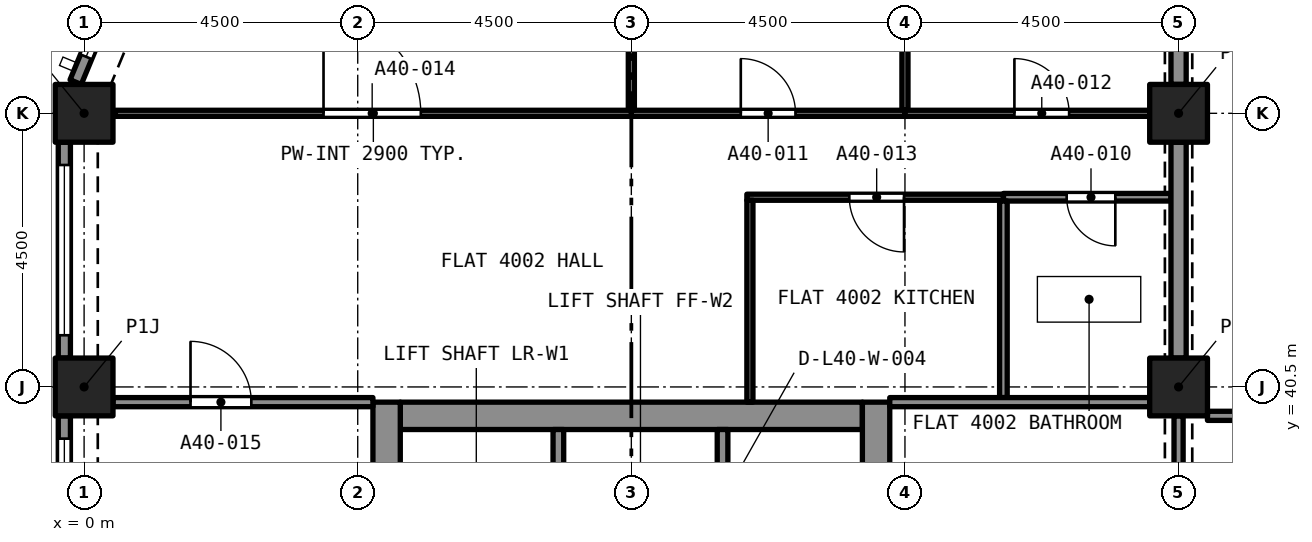
"""IFC4 building model, lengths in metres.
Left out: names, types, materials, properties, quantities, classifications, styles, units other than length and angle.
Written with IfcOpenShell. Run it as: python <this file> out.ifc"""

import sys

from ifc_helpers import new_model, si_unit, direction, frame, frame_2d, origin, origin_2d, place, context, subcontext, project, spatial, rectangle, extrude, element, fill, save


model = new_model("IFC4")
c1 = context("Model", 3, precision=1e-05, world=origin(), true_north=direction((0.0, 1.0)))
c2 = subcontext(c1, "Body", "Model", "MODEL_VIEW")
j1 = project(units=[si_unit("LENGTHUNIT", "METRE"), si_unit("PLANEANGLEUNIT", "RADIAN")], contexts=[c1])
p1 = place(None, origin())
s1 = spatial("IfcSite", under=j1, at=p1, CompositionType="ELEMENT")
p2 = place(p1, origin())
s2 = spatial("IfcBuilding", under=s1, at=p2, CompositionType="ELEMENT")
p3 = place(p2, frame((0.0, 0.0, 143.0)))
s3 = spatial("IfcBuildingStorey", under=s2, at=p3, CompositionType="ELEMENT", Elevation=143.0)
for number, where, z_axis, x_axis in (
    (1, (0.0, 40.5, 0.0), (0.0, 0.0, 1.0), (1.0, 0.0, 0.0)),
    (2, (18.0, 40.5, 0.0), (0.0, 0.0, 1.0), (1.0, 0.0, 0.0)),
    (3, (0.0, 45.0, 0.0), (0.0, 0.0, 1.0), (1.0, 0.0, 0.0)),
    (4, (18.0, 45.0, 0.0), (0.0, 0.0, 1.0), (1.0, 0.0, 0.0)),
):
    element("IfcColumn", number, at=place(p3, frame(where, z_axis=z_axis, x_axis=x_axis)), inside=s3, PredefinedType="COLUMN", context=c2, shape_type="SweptSolid", body=[
        extrude(rectangle(XDim=0.95, YDim=0.95, at=origin_2d()), origin(), (0.0, 0.0, 1.0), 3.2),
    ])
p4 = place(p3, frame((5.2, 40.025, 0.0), z_axis=(0.0, 0.0, 1.0), x_axis=(1.0, 0.0, 0.0)))
e5 = element("IfcWall", 5, at=p4, inside=s3, PredefinedType="SOLIDWALL", context=c2, shape_type="SweptSolid", body=[
    extrude(rectangle(XDim=7.6, YDim=0.45, at=frame_2d((3.8, 0.0))), origin(), (0.0, 0.0, 1.0), 3.2),
])
p5 = place(p3, frame((4.975, 27.25, 0.0), z_axis=(0.0, 0.0, 1.0), x_axis=(0.0, 1.0, 0.0)))
e6 = element("IfcWall", 6, at=p5, inside=s3, PredefinedType="SOLIDWALL", context=c2, shape_type="SweptSolid", body=[
    extrude(rectangle(XDim=13.0, YDim=0.45, at=frame_2d((6.5, 0.0))), origin(), (0.0, 0.0, 1.0), 3.2),
])
p6 = place(p5, frame((8.7, 0.0, 0.0)))
e7 = element("IfcOpeningElement", 7, at=p6, cuts=e6, PredefinedType="OPENING", context=c2, shape_type="SweptSolid", body=[
    extrude(rectangle(XDim=1.2, YDim=2.1, at=frame_2d((0.6, 1.05))), frame((0.0, 0.235, 0.0), z_axis=(0.0, -1.0, 0.0), x_axis=(1.0, 0.0, 0.0)), (0.0, 0.0, 1.0), 0.47),
])
p7 = place(p3, frame((13.025, 27.25, 0.0), z_axis=(0.0, 0.0, 1.0), x_axis=(0.0, 1.0, 0.0)))
e8 = element("IfcWall", 8, at=p7, inside=s3, PredefinedType="SOLIDWALL", context=c2, shape_type="SweptSolid", body=[
    extrude(rectangle(XDim=13.0, YDim=0.45, at=frame_2d((6.5, 0.0))), origin(), (0.0, 0.0, 1.0), 3.2),
])
p8 = place(p7, frame((10.85, 0.0, 0.0)))
e9 = element("IfcOpeningElement", 9, at=p8, cuts=e8, PredefinedType="OPENING", context=c2, shape_type="SweptSolid", body=[
    extrude(rectangle(XDim=1.1, YDim=2.1, at=frame_2d((0.55, 1.05))), frame((0.0, 0.235, 0.0), z_axis=(0.0, -1.0, 0.0), x_axis=(1.0, 0.0, 0.0)), (0.0, 0.0, 1.0), 0.47),
])
p9 = place(p7, frame((8.7, 0.0, 0.0)))
e10 = element("IfcOpeningElement", 10, at=p9, cuts=e8, PredefinedType="OPENING", context=c2, shape_type="SweptSolid", body=[
    extrude(rectangle(XDim=1.2, YDim=2.1, at=frame_2d((0.6, 1.05))), frame((0.0, 0.235, 0.0), z_axis=(0.0, -1.0, 0.0), x_axis=(1.0, 0.0, 0.0)), (0.0, 0.0, 1.0), 0.47),
])
p10 = place(p3, frame((-0.139, 45.513, 0.0), z_axis=(0.0, 0.0, 1.0), x_axis=(0.382680855588, 0.923880599843, 0.0)))
e11 = element("IfcWall", 11, at=p10, inside=s3, PredefinedType="SOLIDWALL", context=c2, shape_type="SweptSolid", body=[
    extrude(rectangle(XDim=2.403, YDim=0.2, at=frame_2d((1.201, 0.0))), origin(), (0.0, 0.0, 1.0), 3.2),
])
p11 = place(p10, frame((0.451, 0.0, 0.45)))
e12 = element("IfcOpeningElement", 12, at=p11, cuts=e11, PredefinedType="OPENING", context=c2, shape_type="SweptSolid", body=[
    extrude(rectangle(XDim=1.7, YDim=1.95, at=frame_2d((0.85, 0.975))), frame((0.0, 0.11, 0.0), z_axis=(0.0, -1.0, 0.0), x_axis=(1.0, 0.0, 0.0)), (0.0, 0.0, 1.0), 0.22),
])
p12 = place(p3, frame((-0.325, 40.975, 0.0), z_axis=(0.0, 0.0, 1.0), x_axis=(0.0, 1.0, 0.0)))
e13 = element("IfcWall", 13, at=p12, inside=s3, PredefinedType="SOLIDWALL", context=c2, shape_type="SweptSolid", body=[
    extrude(rectangle(XDim=3.55, YDim=0.2, at=frame_2d((1.775, 0.0))), origin(), (0.0, 0.0, 1.0), 3.2),
])
p13 = place(p12, frame((0.375, 0.0, 0.45)))
e14 = element("IfcOpeningElement", 14, at=p13, cuts=e13, PredefinedType="OPENING", context=c2, shape_type="SweptSolid", body=[
    extrude(rectangle(XDim=2.8, YDim=1.95, at=frame_2d((1.4, 0.975))), frame((0.0, 0.11, 0.0), z_axis=(0.0, -1.0, 0.0), x_axis=(1.0, 0.0, 0.0)), (0.0, 0.0, 1.0), 0.22),
])
p14 = place(p3, frame((-0.325, 36.475, 0.0), z_axis=(0.0, 0.0, 1.0), x_axis=(0.0, 1.0, 0.0)))
e15 = element("IfcWall", 15, at=p14, inside=s3, PredefinedType="SOLIDWALL", context=c2, shape_type="SweptSolid", body=[
    extrude(rectangle(XDim=3.55, YDim=0.2, at=frame_2d((1.775, 0.0))), origin(), (0.0, 0.0, 1.0), 3.2),
])
p15 = place(p14, frame((0.375, 0.0, 0.45)))
e16 = element("IfcOpeningElement", 16, at=p15, cuts=e15, PredefinedType="OPENING", context=c2, shape_type="SweptSolid", body=[
    extrude(rectangle(XDim=2.8, YDim=1.95, at=frame_2d((1.4, 0.975))), frame((0.0, 0.11, 0.0), z_axis=(0.0, -1.0, 0.0), x_axis=(1.0, 0.0, 0.0)), (0.0, 0.0, 1.0), 0.22),
])
p16 = place(p3, frame((17.875, 43.62, 0.0), z_axis=(0.0, 0.0, 1.0), x_axis=(-1.0, 0.0, 0.0)))
e17 = element("IfcWall", 17, at=p16, inside=s3, PredefinedType="PARTITIONING", context=c2, shape_type="SweptSolid", body=[
    extrude(rectangle(XDim=2.756, YDim=0.125, at=frame_2d((1.378, 0.0))), origin(), (0.0, 0.0, 1.0), 2.9),
])
p17 = place(p16, frame((0.915, 0.0, 0.0)))
e18 = element("IfcOpeningElement", 18, at=p17, cuts=e17, PredefinedType="OPENING", context=c2, shape_type="SweptSolid", body=[
    extrude(rectangle(XDim=0.8, YDim=2.1, at=frame_2d((0.4, 1.05))), frame((0.0, 0.073, 0.0), z_axis=(0.0, -1.0, 0.0), x_axis=(1.0, 0.0, 0.0)), (0.0, 0.0, 1.0), 0.145),
])
p18 = place(p3, frame((15.119, 40.325, 0.0), z_axis=(0.0, 0.0, 1.0), x_axis=(0.0, 1.0, 0.0)))
e19 = element("IfcWall", 19, at=p18, inside=s3, PredefinedType="PARTITIONING", context=c2, shape_type="SweptSolid", body=[
    extrude(rectangle(XDim=3.233, YDim=0.125, at=frame_2d((1.616, 0.0))), origin(), (0.0, 0.0, 1.0), 2.9),
])
p19 = place(p3, frame((18.0, 40.975, 0.0), z_axis=(0.0, 0.0, 1.0), x_axis=(0.0, 1.0, 0.0)))
e20 = element("IfcWall", 20, at=p19, inside=s3, PredefinedType="PARTITIONING", context=c2, shape_type="SweptSolid", body=[
    extrude(rectangle(XDim=3.55, YDim=0.25, at=frame_2d((1.775, 0.0))), origin(), (0.0, 0.0, 1.0), 2.38),
])
p20 = place(p3, frame((13.5, 45.05, 0.0), z_axis=(0.0, 0.0, 1.0), x_axis=(0.0, 1.0, 0.0)))
e21 = element("IfcWall", 21, at=p20, inside=s3, PredefinedType="PARTITIONING", context=c2, shape_type="SweptSolid", body=[
    extrude(rectangle(XDim=3.975, YDim=0.1, at=frame_2d((1.987, 0.0))), origin(), (0.0, 0.0, 1.0), 2.9),
])
p21 = place(p3, frame((9.0, 45.0, 0.0), z_axis=(0.0, 0.0, 1.0), x_axis=(1.0, 0.0, 0.0)))
e22 = element("IfcWall", 22, at=p21, inside=s3, PredefinedType="PARTITIONING", context=c2, shape_type="SweptSolid", body=[
    extrude(rectangle(XDim=4.5, YDim=0.1, at=frame_2d((2.25, 0.0))), origin(), (0.0, 0.0, 1.0), 2.9),
])
p22 = place(p21, frame((1.8, 0.0, 0.0)))
e23 = element("IfcOpeningElement", 23, at=p22, cuts=e22, PredefinedType="OPENING", context=c2, shape_type="SweptSolid", body=[
    extrude(rectangle(XDim=0.9, YDim=2.1, at=frame_2d((0.45, 1.05))), frame((0.0, 0.06, 0.0), z_axis=(0.0, -1.0, 0.0), x_axis=(1.0, 0.0, 0.0)), (0.0, 0.0, 1.0), 0.12),
])
p23 = place(p3, frame((9.0, 45.05, 0.0), z_axis=(0.0, 0.0, 1.0), x_axis=(0.0, 1.0, 0.0)))
e24 = element("IfcWall", 24, at=p23, inside=s3, PredefinedType="PARTITIONING", context=c2, shape_type="SweptSolid", body=[
    extrude(rectangle(XDim=3.975, YDim=0.1, at=frame_2d((1.987, 0.0))), origin(), (0.0, 0.0, 1.0), 2.9),
])
p24 = place(p3, frame((13.5, 45.0, 0.0), z_axis=(0.0, 0.0, 1.0), x_axis=(1.0, 0.0, 0.0)))
e25 = element("IfcWall", 25, at=p24, inside=s3, PredefinedType="PARTITIONING", context=c2, shape_type="SweptSolid", body=[
    extrude(rectangle(XDim=4.025, YDim=0.1, at=frame_2d((2.012, 0.0))), origin(), (0.0, 0.0, 1.0), 2.9),
])
p25 = place(p24, frame((1.8, 0.0, 0.0)))
e26 = element("IfcOpeningElement", 26, at=p25, cuts=e25, PredefinedType="OPENING", context=c2, shape_type="SweptSolid", body=[
    extrude(rectangle(XDim=0.9, YDim=2.1, at=frame_2d((0.45, 1.05))), frame((0.0, 0.06, 0.0), z_axis=(0.0, -1.0, 0.0), x_axis=(1.0, 0.0, 0.0)), (0.0, 0.0, 1.0), 0.12),
])
p26 = place(p3, frame((18.0, 45.475, 0.0), z_axis=(0.0, 0.0, 1.0), x_axis=(0.0, 1.0, 0.0)))
e27 = element("IfcWall", 27, at=p26, inside=s3, PredefinedType="PARTITIONING", context=c2, shape_type="SweptSolid", body=[
    extrude(rectangle(XDim=3.55, YDim=0.25, at=frame_2d((1.775, 0.0))), origin(), (0.0, 0.0, 1.0), 2.38),
])
p27 = place(p3, frame((15.119, 43.62, 0.0), z_axis=(0.0, 0.0, 1.0), x_axis=(-1.0, 0.0, 0.0)))
e28 = element("IfcWall", 28, at=p27, inside=s3, PredefinedType="PARTITIONING", context=c2, shape_type="SweptSolid", body=[
    extrude(rectangle(XDim=4.219, YDim=0.1, at=frame_2d((2.11, 0.0))), origin(), (0.0, 0.0, 1.0), 2.9),
])
p28 = place(p27, frame((1.635, 0.0, 0.0)))
e29 = element("IfcOpeningElement", 29, at=p28, cuts=e28, PredefinedType="OPENING", context=c2, shape_type="SweptSolid", body=[
    extrude(rectangle(XDim=0.9, YDim=2.1, at=frame_2d((0.45, 1.05))), frame((0.0, 0.06, 0.0), z_axis=(0.0, -1.0, 0.0), x_axis=(1.0, 0.0, 0.0)), (0.0, 0.0, 1.0), 0.12),
])
p29 = place(p3, frame((10.95, 40.25, 0.0), z_axis=(0.0, 0.0, 1.0), x_axis=(0.0, 1.0, 0.0)))
e30 = element("IfcWall", 30, at=p29, inside=s3, PredefinedType="PARTITIONING", context=c2, shape_type="SweptSolid", body=[
    extrude(rectangle(XDim=3.32, YDim=0.1, at=frame_2d((1.66, 0.0))), origin(), (0.0, 0.0, 1.0), 2.9),
])
p30 = place(p3, frame((0.514, 45.0, 0.0), z_axis=(0.0, 0.0, 1.0), x_axis=(1.0, 0.0, 0.0)))
e31 = element("IfcWall", 31, at=p30, inside=s3, PredefinedType="PARTITIONING", context=c2, shape_type="SweptSolid", body=[
    extrude(rectangle(XDim=8.486, YDim=0.1, at=frame_2d((4.243, 0.0))), origin(), (0.0, 0.0, 1.0), 2.9),
])
p31 = place(p30, frame((3.423, 0.0, 0.0)))
e32 = element("IfcOpeningElement", 32, at=p31, cuts=e31, PredefinedType="OPENING", context=c2, shape_type="SweptSolid", body=[
    extrude(rectangle(XDim=1.6, YDim=2.1, at=frame_2d((0.8, 1.05))), frame((0.0, 0.06, 0.0), z_axis=(0.0, -1.0, 0.0), x_axis=(1.0, 0.0, 0.0)), (0.0, 0.0, 1.0), 0.12),
])
p32 = place(p3, frame((0.475, 40.25, 0.0), z_axis=(0.0, 0.0, 1.0), x_axis=(1.0, 0.0, 0.0)))
e33 = element("IfcWall", 33, at=p32, inside=s3, PredefinedType="PARTITIONING", context=c2, shape_type="SweptSolid", body=[
    extrude(rectangle(XDim=4.275, YDim=0.15, at=frame_2d((2.137, 0.0))), origin(), (0.0, 0.0, 1.0), 2.9),
])
p33 = place(p32, frame((1.275, 0.0, 0.0)))
e34 = element("IfcOpeningElement", 34, at=p33, cuts=e33, PredefinedType="OPENING", context=c2, shape_type="SweptSolid", body=[
    extrude(rectangle(XDim=1.0, YDim=2.1, at=frame_2d((0.5, 1.05))), frame((0.0, 0.085, 0.0), z_axis=(0.0, -1.0, 0.0), x_axis=(1.0, 0.0, 0.0)), (0.0, 0.0, 1.0), 0.17),
])
p34 = place(p3, frame((13.25, 40.25, 0.0), z_axis=(0.0, 0.0, 1.0), x_axis=(1.0, 0.0, 0.0)))
e35 = element("IfcWall", 35, at=p34, inside=s3, PredefinedType="PARTITIONING", context=c2, shape_type="SweptSolid", body=[
    extrude(rectangle(XDim=4.275, YDim=0.15, at=frame_2d((2.137, 0.0))), origin(), (0.0, 0.0, 1.0), 2.9),
])
p35 = place(p3, frame((18.475, 40.025, 0.0), z_axis=(0.0, 0.0, 1.0), x_axis=(1.0, 0.0, 0.0)))
e36 = element("IfcWall", 36, at=p35, inside=s3, PredefinedType="PARTITIONING", context=c2, shape_type="SweptSolid", body=[
    extrude(rectangle(XDim=12.55, YDim=0.15, at=frame_2d((6.275, 0.0))), origin(), (0.0, 0.0, 1.0), 2.75),
])
p36 = place(p35, frame((5.775, 0.0, 0.0)))
e37 = element("IfcOpeningElement", 37, at=p36, cuts=e36, PredefinedType="OPENING", context=c2, shape_type="SweptSolid", body=[
    extrude(rectangle(XDim=1.0, YDim=2.1, at=frame_2d((0.5, 1.05))), frame((0.0, 0.085, 0.0), z_axis=(0.0, -1.0, 0.0), x_axis=(1.0, 0.0, 0.0)), (0.0, 0.0, 1.0), 0.17),
])
p37 = place(p3, frame((18.0, 40.025, 0.0), z_axis=(0.0, 0.0, 1.0), x_axis=(0.0, -1.0, 0.0)))
e38 = element("IfcWall", 38, at=p37, inside=s3, PredefinedType="PARTITIONING", context=c2, shape_type="SweptSolid", body=[
    extrude(rectangle(XDim=3.55, YDim=0.15, at=frame_2d((1.775, 0.0))), origin(), (0.0, 0.0, 1.0), 2.38),
])
p38 = place(p37, frame((1.175, 0.0, 0.0)))
e39 = element("IfcOpeningElement", 39, at=p38, cuts=e38, PredefinedType="OPENING", context=c2, shape_type="SweptSolid", body=[
    extrude(rectangle(XDim=1.2, YDim=2.1, at=frame_2d((0.6, 1.05))), frame((0.0, 0.085, 0.0), z_axis=(0.0, -1.0, 0.0), x_axis=(1.0, 0.0, 0.0)), (0.0, 0.0, 1.0), 0.17),
])
p39 = place(p3, frame((7.8, 37.5, 0.0), z_axis=(0.0, 0.0, 1.0), x_axis=(0.0, 1.0, 0.0)))
e40 = element("IfcWall", 40, at=p39, inside=s3, PredefinedType="SOLIDWALL", context=c2, shape_type="SweptSolid", body=[
    extrude(rectangle(XDim=2.3, YDim=0.175, at=frame_2d((1.15, 0.0))), origin(), (0.0, 0.0, 1.0), 2.9),
])
p40 = place(p3, frame((10.5, 37.5, 0.0), z_axis=(0.0, 0.0, 1.0), x_axis=(0.0, 1.0, 0.0)))
e41 = element("IfcWall", 41, at=p40, inside=s3, PredefinedType="SOLIDWALL", context=c2, shape_type="SweptSolid", body=[
    extrude(rectangle(XDim=2.3, YDim=0.175, at=frame_2d((1.15, 0.0))), origin(), (0.0, 0.0, 1.0), 2.9),
])
p41 = place(p40, frame((0.65, 0.0, 0.0)))
e42 = element("IfcOpeningElement", 42, at=p41, cuts=e41, PredefinedType="OPENING", context=c2, shape_type="SweptSolid", body=[
    extrude(rectangle(XDim=1.0, YDim=2.1, at=frame_2d((0.5, 1.05))), frame((0.0, 0.097, 0.0), z_axis=(0.0, -1.0, 0.0), x_axis=(1.0, 0.0, 0.0)), (0.0, 0.0, 1.0), 0.195),
])
p42 = place(p11, origin())
e43 = element("IfcWindow", 43, at=p42, inside=s3, PartitioningType="SINGLE_PANEL", PredefinedType="WINDOW", context=c2, shape_type="SweptSolid", body=[
    extrude(rectangle(XDim=1.7, YDim=1.95, at=frame_2d((0.85, 0.975))), frame((0.0, 0.03, 0.0), z_axis=(0.0, -1.0, 0.0), x_axis=(1.0, 0.0, 0.0)), (0.0, 0.0, 1.0), 0.06),
])
fill(e12, e43)
p43 = place(p13, origin())
e44 = element("IfcWindow", 44, at=p43, inside=s3, PartitioningType="SINGLE_PANEL", PredefinedType="WINDOW", context=c2, shape_type="SweptSolid", body=[
    extrude(rectangle(XDim=2.8, YDim=1.95, at=frame_2d((1.4, 0.975))), frame((0.0, 0.03, 0.0), z_axis=(0.0, -1.0, 0.0), x_axis=(1.0, 0.0, 0.0)), (0.0, 0.0, 1.0), 0.06),
])
fill(e14, e44)
p44 = place(p15, origin())
e45 = element("IfcWindow", 45, at=p44, inside=s3, PartitioningType="SINGLE_PANEL", PredefinedType="WINDOW", context=c2, shape_type="SweptSolid", body=[
    extrude(rectangle(XDim=2.8, YDim=1.95, at=frame_2d((1.4, 0.975))), frame((0.0, 0.03, 0.0), z_axis=(0.0, -1.0, 0.0), x_axis=(1.0, 0.0, 0.0)), (0.0, 0.0, 1.0), 0.06),
])
fill(e16, e45)
p45 = place(p17, origin())
e46 = element("IfcDoor", 46, at=p45, inside=s3, OperationType="SINGLE_SWING_LEFT", PredefinedType="DOOR", context=c2, shape_type="SweptSolid", body=[
    extrude(rectangle(XDim=0.8, YDim=2.1, at=frame_2d((0.4, 1.05))), frame((0.0, 0.025, 0.0), z_axis=(0.0, -1.0, 0.0), x_axis=(1.0, 0.0, 0.0)), (0.0, 0.0, 1.0), 0.05),
])
fill(e18, e46)
p46 = place(p22, origin())
e47 = element("IfcDoor", 47, at=p46, inside=s3, OperationType="SINGLE_SWING_LEFT", PredefinedType="DOOR", context=c2, shape_type="SweptSolid", body=[
    extrude(rectangle(XDim=0.9, YDim=2.1, at=frame_2d((0.45, 1.05))), frame((0.0, 0.025, 0.0), z_axis=(0.0, -1.0, 0.0), x_axis=(1.0, 0.0, 0.0)), (0.0, 0.0, 1.0), 0.05),
])
fill(e23, e47)
p47 = place(p25, origin())
e48 = element("IfcDoor", 48, at=p47, inside=s3, OperationType="SINGLE_SWING_RIGHT", PredefinedType="DOOR", context=c2, shape_type="SweptSolid", body=[
    extrude(rectangle(XDim=0.9, YDim=2.1, at=frame_2d((0.45, 1.05))), frame((0.0, 0.025, 0.0), z_axis=(0.0, -1.0, 0.0), x_axis=(1.0, 0.0, 0.0)), (0.0, 0.0, 1.0), 0.05),
])
fill(e26, e48)
p48 = place(p28, origin())
e49 = element("IfcDoor", 49, at=p48, inside=s3, OperationType="SINGLE_SWING_LEFT", PredefinedType="DOOR", context=c2, shape_type="SweptSolid", body=[
    extrude(rectangle(XDim=0.9, YDim=2.1, at=frame_2d((0.45, 1.05))), frame((0.0, 0.025, 0.0), z_axis=(0.0, -1.0, 0.0), x_axis=(1.0, 0.0, 0.0)), (0.0, 0.0, 1.0), 0.05),
])
fill(e29, e49)
p49 = place(p31, origin())
e50 = element("IfcDoor", 50, at=p49, inside=s3, OperationType="SINGLE_SWING_LEFT", PredefinedType="DOOR", context=c2, shape_type="SweptSolid", body=[
    extrude(rectangle(XDim=1.6, YDim=2.1, at=frame_2d((0.8, 1.05))), frame((0.0, 0.025, 0.0), z_axis=(0.0, -1.0, 0.0), x_axis=(1.0, 0.0, 0.0)), (0.0, 0.0, 1.0), 0.05),
])
fill(e32, e50)
p50 = place(p33, origin())
e51 = element("IfcDoor", 51, at=p50, inside=s3, OperationType="SINGLE_SWING_LEFT", PredefinedType="DOOR", context=c2, shape_type="SweptSolid", body=[
    extrude(rectangle(XDim=1.0, YDim=2.1, at=frame_2d((0.5, 1.05))), frame((0.0, 0.025, 0.0), z_axis=(0.0, -1.0, 0.0), x_axis=(1.0, 0.0, 0.0)), (0.0, 0.0, 1.0), 0.05),
])
fill(e34, e51)
save(model, sys.argv[1])
